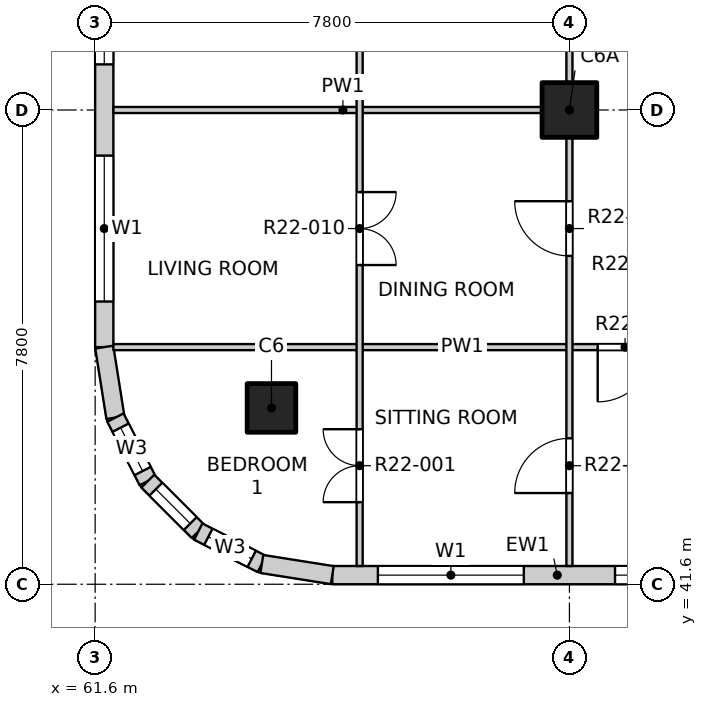
"""IFC4 building model, lengths in metres.
Left out: names, types, materials, properties, quantities, classifications, styles, units other than length and angle.
Written with IfcOpenShell. Run it as: python <this file> out.ifc"""

import sys

from ifc_helpers import new_model, si_unit, direction, frame, frame_2d, origin, origin_2d, place, context, subcontext, project, spatial, rectangle, extrude, element, fill, save


model = new_model("IFC4")
c1 = context("Model", 3, precision=1e-05, world=origin(), true_north=direction((0.0, 1.0)))
c2 = subcontext(c1, "Body", "Model", "MODEL_VIEW")
j1 = project(units=[si_unit("LENGTHUNIT", "METRE"), si_unit("PLANEANGLEUNIT", "RADIAN")], contexts=[c1])
p1 = place(None, origin())
s1 = spatial("IfcSite", under=j1, at=p1, CompositionType="ELEMENT")
p2 = place(p1, origin())
s2 = spatial("IfcBuilding", under=s1, at=p2, CompositionType="ELEMENT")
p3 = place(p2, frame((0.0, 0.0, 224.5)))
s3 = spatial("IfcBuildingStorey", under=s2, at=p3, CompositionType="ELEMENT", Elevation=224.5)
p4 = place(p3, frame((64.5, 44.5, -0.25), z_axis=(0.0, 0.0, 1.0), x_axis=(1.0, 0.0, 0.0)))
e1 = element("IfcColumn", 1, at=p4, inside=s3, PredefinedType="COLUMN", context=c2, shape_type="SweptSolid", body=[
    extrude(rectangle(XDim=0.8, YDim=0.8, at=origin_2d()), origin(), (0.0, 0.0, 1.0), 3.4),
])
p5 = place(p3, frame((69.4, 49.4, -0.25), z_axis=(0.0, 0.0, 1.0), x_axis=(1.0, 0.0, 0.0)))
e2 = element("IfcColumn", 2, at=p5, inside=s3, PredefinedType="COLUMN", context=c2, shape_type="SweptSolid", body=[
    extrude(rectangle(XDim=0.9, YDim=0.9, at=origin_2d()), origin(), (0.0, 0.0, 1.0), 3.4),
])
p6 = place(p3, frame((65.5, 41.75, 0.0), z_axis=(0.0, 0.0, 1.0), x_axis=(1.0, 0.0, 0.0)))
e3 = element("IfcWall", 3, at=p6, inside=s3, PredefinedType="SOLIDWALL", context=c2, shape_type="SweptSolid", body=[
    extrude(rectangle(XDim=7.4, YDim=0.3, at=frame_2d((3.7, 0.0))), origin(), (0.0, 0.0, 1.0), 2.7),
])
p7 = place(p6, frame((0.75, 0.0, 0.9)))
e4 = element("IfcOpeningElement", 4, at=p7, cuts=e3, PredefinedType="OPENING", context=c2, shape_type="SweptSolid", body=[
    extrude(rectangle(XDim=2.4, YDim=1.8, at=frame_2d((1.2, 0.9))), frame((0.0, 0.16, 0.0), z_axis=(0.0, -1.0, 0.0), x_axis=(1.0, 0.0, 0.0)), (0.0, 0.0, 1.0), 0.32),
])
p8 = place(p6, frame((4.65, 0.0, 0.9)))
e5 = element("IfcOpeningElement", 5, at=p8, cuts=e3, PredefinedType="OPENING", context=c2, shape_type="SweptSolid", body=[
    extrude(rectangle(XDim=2.4, YDim=1.8, at=frame_2d((1.2, 0.9))), frame((0.0, 0.16, 0.0), z_axis=(0.0, -1.0, 0.0), x_axis=(1.0, 0.0, 0.0)), (0.0, 0.0, 1.0), 0.32),
])
p9 = place(p3, frame((61.75, 45.5, 0.0), z_axis=(0.0, 0.0, 1.0), x_axis=(0.0, 1.0, 0.0)))
e6 = element("IfcWall", 6, at=p9, inside=s3, PredefinedType="SOLIDWALL", context=c2, shape_type="SweptSolid", body=[
    extrude(rectangle(XDim=7.4, YDim=0.3, at=frame_2d((3.7, 0.0))), origin(), (0.0, 0.0, 1.0), 2.7),
])
p10 = place(p9, frame((0.75, 0.0, 0.9)))
e7 = element("IfcOpeningElement", 7, at=p10, cuts=e6, PredefinedType="OPENING", context=c2, shape_type="SweptSolid", body=[
    extrude(rectangle(XDim=2.4, YDim=1.8, at=frame_2d((1.2, 0.9))), frame((0.0, 0.16, 0.0), z_axis=(0.0, -1.0, 0.0), x_axis=(1.0, 0.0, 0.0)), (0.0, 0.0, 1.0), 0.32),
])
p11 = place(p9, frame((4.65, 0.0, 0.9)))
e8 = element("IfcOpeningElement", 8, at=p11, cuts=e6, PredefinedType="OPENING", context=c2, shape_type="SweptSolid", body=[
    extrude(rectangle(XDim=2.4, YDim=1.8, at=frame_2d((1.2, 0.9))), frame((0.0, 0.16, 0.0), z_axis=(0.0, -1.0, 0.0), x_axis=(1.0, 0.0, 0.0)), (0.0, 0.0, 1.0), 0.32),
])
p12 = place(p3, frame((61.75, 45.5, 0.0), z_axis=(0.0, 0.0, 1.0), x_axis=(0.156496880861, -0.987678452879, 0.0)))
e9 = element("IfcWall", 9, at=p12, inside=s3, PredefinedType="SOLIDWALL", context=c2, shape_type="SweptSolid", body=[
    extrude(rectangle(XDim=1.173, YDim=0.3, at=frame_2d((0.586, 0.0))), origin(), (0.0, 0.0, 1.0), 2.7),
])
p13 = place(p3, frame((61.934, 44.341, 0.0), z_axis=(0.0, 0.0, 1.0), x_axis=(0.454025524128, -0.890988677504, 0.0)))
e10 = element("IfcWall", 10, at=p13, inside=s3, PredefinedType="SOLIDWALL", context=c2, shape_type="SweptSolid", body=[
    extrude(rectangle(XDim=1.173, YDim=0.3, at=frame_2d((0.587, 0.0))), origin(), (0.0, 0.0, 1.0), 2.7),
])
p14 = place(p13, frame((0.187, 0.0, 0.9)))
e11 = element("IfcOpeningElement", 11, at=p14, cuts=e10, PredefinedType="OPENING", context=c2, shape_type="SweptSolid", body=[
    extrude(rectangle(XDim=0.8, YDim=1.2, at=frame_2d((0.4, 0.6))), frame((0.0, 0.16, 0.0), z_axis=(0.0, -1.0, 0.0), x_axis=(1.0, 0.0, 0.0)), (0.0, 0.0, 1.0), 0.32),
])
p15 = place(p3, frame((62.466, 43.296, 0.0), z_axis=(0.0, 0.0, 1.0), x_axis=(0.707106781187, -0.707106781187, 0.0)))
e12 = element("IfcWall", 12, at=p15, inside=s3, PredefinedType="SOLIDWALL", context=c2, shape_type="SweptSolid", body=[
    extrude(rectangle(XDim=1.173, YDim=0.3, at=frame_2d((0.586, 0.0))), origin(), (0.0, 0.0, 1.0), 2.7),
])
p16 = place(p15, frame((0.187, 0.0, 0.9)))
e13 = element("IfcOpeningElement", 13, at=p16, cuts=e12, PredefinedType="OPENING", context=c2, shape_type="SweptSolid", body=[
    extrude(rectangle(XDim=0.8, YDim=1.2, at=frame_2d((0.4, 0.6))), frame((0.0, 0.16, 0.0), z_axis=(0.0, -1.0, 0.0), x_axis=(1.0, 0.0, 0.0)), (0.0, 0.0, 1.0), 0.32),
])
p17 = place(p3, frame((63.296, 42.466, 0.0), z_axis=(0.0, 0.0, 1.0), x_axis=(0.890988677504, -0.454025524128, 0.0)))
e14 = element("IfcWall", 14, at=p17, inside=s3, PredefinedType="SOLIDWALL", context=c2, shape_type="SweptSolid", body=[
    extrude(rectangle(XDim=1.173, YDim=0.3, at=frame_2d((0.587, 0.0))), origin(), (0.0, 0.0, 1.0), 2.7),
])
p18 = place(p17, frame((0.187, 0.0, 0.9)))
e15 = element("IfcOpeningElement", 15, at=p18, cuts=e14, PredefinedType="OPENING", context=c2, shape_type="SweptSolid", body=[
    extrude(rectangle(XDim=0.8, YDim=1.2, at=frame_2d((0.4, 0.6))), frame((0.0, 0.16, 0.0), z_axis=(0.0, -1.0, 0.0), x_axis=(1.0, 0.0, 0.0)), (0.0, 0.0, 1.0), 0.32),
])
p19 = place(p3, frame((64.341, 41.934, 0.0), z_axis=(0.0, 0.0, 1.0), x_axis=(0.987678452879, -0.156496880861, 0.0)))
e16 = element("IfcWall", 16, at=p19, inside=s3, PredefinedType="SOLIDWALL", context=c2, shape_type="SweptSolid", body=[
    extrude(rectangle(XDim=1.173, YDim=0.3, at=frame_2d((0.586, 0.0))), origin(), (0.0, 0.0, 1.0), 2.7),
])
p20 = place(p3, frame((61.9, 45.5, 0.0), z_axis=(0.0, 0.0, 1.0), x_axis=(1.0, 0.0, 0.0)))
e17 = element("IfcWall", 17, at=p20, inside=s3, PredefinedType="PARTITIONING", context=c2, shape_type="SweptSolid", body=[
    extrude(rectangle(XDim=11.475, YDim=0.1, at=frame_2d((5.737, 0.0))), origin(), (0.0, 0.0, 1.0), 3.15),
])
p21 = place(p20, frame((7.965, 0.0, 0.0)))
e18 = element("IfcOpeningElement", 18, at=p21, cuts=e17, PredefinedType="OPENING", context=c2, shape_type="SweptSolid", body=[
    extrude(rectangle(XDim=0.9, YDim=2.1, at=frame_2d((0.45, 1.05))), frame((0.0, 0.06, 0.0), z_axis=(0.0, -1.0, 0.0), x_axis=(1.0, 0.0, 0.0)), (0.0, 0.0, 1.0), 0.12),
])
p22 = place(p3, frame((61.9, 49.4, 0.0), z_axis=(0.0, 0.0, 1.0), x_axis=(1.0, 0.0, 0.0)))
e19 = element("IfcWall", 19, at=p22, inside=s3, PredefinedType="PARTITIONING", context=c2, shape_type="SweptSolid", body=[
    extrude(rectangle(XDim=7.55, YDim=0.1, at=frame_2d((3.775, 0.0))), origin(), (0.0, 0.0, 1.0), 3.15),
])
p23 = place(p3, frame((65.95, 41.9, 0.0), z_axis=(0.0, 0.0, 1.0), x_axis=(0.0, 1.0, 0.0)))
e20 = element("IfcWall", 20, at=p23, inside=s3, PredefinedType="PARTITIONING", context=c2, shape_type="SweptSolid", body=[
    extrude(rectangle(XDim=19.1, YDim=0.1, at=frame_2d((9.55, 0.0))), origin(), (0.0, 0.0, 1.0), 3.15),
])
p24 = place(p23, frame((1.05, 0.0, 0.0)))
e21 = element("IfcOpeningElement", 21, at=p24, cuts=e20, PredefinedType="OPENING", context=c2, shape_type="SweptSolid", body=[
    extrude(rectangle(XDim=1.2, YDim=2.1, at=frame_2d((0.6, 1.05))), frame((0.0, 0.06, 0.0), z_axis=(0.0, -1.0, 0.0), x_axis=(1.0, 0.0, 0.0)), (0.0, 0.0, 1.0), 0.12),
])
p25 = place(p23, frame((4.95, 0.0, 0.0)))
e22 = element("IfcOpeningElement", 22, at=p25, cuts=e20, PredefinedType="OPENING", context=c2, shape_type="SweptSolid", body=[
    extrude(rectangle(XDim=1.2, YDim=2.1, at=frame_2d((0.6, 1.05))), frame((0.0, 0.06, 0.0), z_axis=(0.0, -1.0, 0.0), x_axis=(1.0, 0.0, 0.0)), (0.0, 0.0, 1.0), 0.12),
])
p26 = place(p23, frame((8.85, 0.0, 0.0)))
e23 = element("IfcOpeningElement", 23, at=p26, cuts=e20, PredefinedType="OPENING", context=c2, shape_type="SweptSolid", body=[
    extrude(rectangle(XDim=1.2, YDim=2.1, at=frame_2d((0.6, 1.05))), frame((0.0, 0.06, 0.0), z_axis=(0.0, -1.0, 0.0), x_axis=(1.0, 0.0, 0.0)), (0.0, 0.0, 1.0), 0.12),
])
p27 = place(p23, frame((11.925, 0.0, 0.0)))
e24 = element("IfcOpeningElement", 24, at=p27, cuts=e20, PredefinedType="OPENING", context=c2, shape_type="SweptSolid", body=[
    extrude(rectangle(XDim=0.9, YDim=2.1, at=frame_2d((0.45, 1.05))), frame((0.0, 0.06, 0.0), z_axis=(0.0, -1.0, 0.0), x_axis=(1.0, 0.0, 0.0)), (0.0, 0.0, 1.0), 0.12),
])
p28 = place(p23, frame((13.875, 0.0, 0.0)))
e25 = element("IfcOpeningElement", 25, at=p28, cuts=e20, PredefinedType="OPENING", context=c2, shape_type="SweptSolid", body=[
    extrude(rectangle(XDim=0.9, YDim=2.1, at=frame_2d((0.45, 1.05))), frame((0.0, 0.06, 0.0), z_axis=(0.0, -1.0, 0.0), x_axis=(1.0, 0.0, 0.0)), (0.0, 0.0, 1.0), 0.12),
])
p29 = place(p23, frame((15.825, 0.0, 0.0)))
e26 = element("IfcOpeningElement", 26, at=p29, cuts=e20, PredefinedType="OPENING", context=c2, shape_type="SweptSolid", body=[
    extrude(rectangle(XDim=0.9, YDim=2.1, at=frame_2d((0.45, 1.05))), frame((0.0, 0.06, 0.0), z_axis=(0.0, -1.0, 0.0), x_axis=(1.0, 0.0, 0.0)), (0.0, 0.0, 1.0), 0.12),
])
p30 = place(p23, frame((17.775, 0.0, 0.0)))
e27 = element("IfcOpeningElement", 27, at=p30, cuts=e20, PredefinedType="OPENING", context=c2, shape_type="SweptSolid", body=[
    extrude(rectangle(XDim=0.9, YDim=2.1, at=frame_2d((0.45, 1.05))), frame((0.0, 0.06, 0.0), z_axis=(0.0, -1.0, 0.0), x_axis=(1.0, 0.0, 0.0)), (0.0, 0.0, 1.0), 0.12),
])
p31 = place(p3, frame((69.4, 41.9, 0.0), z_axis=(0.0, 0.0, 1.0), x_axis=(0.0, 1.0, 0.0)))
e28 = element("IfcWall", 28, at=p31, inside=s3, PredefinedType="PARTITIONING", context=c2, shape_type="SweptSolid", body=[
    extrude(rectangle(XDim=46.2, YDim=0.1, at=frame_2d((23.1, 0.0))), origin(), (0.0, 0.0, 1.0), 3.15),
])
p32 = place(p31, frame((1.2, 0.0, 0.0)))
e29 = element("IfcOpeningElement", 29, at=p32, cuts=e28, PredefinedType="OPENING", context=c2, shape_type="SweptSolid", body=[
    extrude(rectangle(XDim=0.9, YDim=2.1, at=frame_2d((0.45, 1.05))), frame((0.0, 0.06, 0.0), z_axis=(0.0, -1.0, 0.0), x_axis=(1.0, 0.0, 0.0)), (0.0, 0.0, 1.0), 0.12),
])
p33 = place(p31, frame((5.1, 0.0, 0.0)))
e30 = element("IfcOpeningElement", 30, at=p33, cuts=e28, PredefinedType="OPENING", context=c2, shape_type="SweptSolid", body=[
    extrude(rectangle(XDim=0.9, YDim=2.1, at=frame_2d((0.45, 1.05))), frame((0.0, 0.06, 0.0), z_axis=(0.0, -1.0, 0.0), x_axis=(1.0, 0.0, 0.0)), (0.0, 0.0, 1.0), 0.12),
])
p34 = place(p31, frame((9.0, 0.0, 0.0)))
e31 = element("IfcOpeningElement", 31, at=p34, cuts=e28, PredefinedType="OPENING", context=c2, shape_type="SweptSolid", body=[
    extrude(rectangle(XDim=0.9, YDim=2.1, at=frame_2d((0.45, 1.05))), frame((0.0, 0.06, 0.0), z_axis=(0.0, -1.0, 0.0), x_axis=(1.0, 0.0, 0.0)), (0.0, 0.0, 1.0), 0.12),
])
p35 = place(p31, frame((13.85, 0.0, 0.0)))
e32 = element("IfcOpeningElement", 32, at=p35, cuts=e28, PredefinedType="OPENING", context=c2, shape_type="SweptSolid", body=[
    extrude(rectangle(XDim=0.9, YDim=2.1, at=frame_2d((0.45, 1.05))), frame((0.0, 0.06, 0.0), z_axis=(0.0, -1.0, 0.0), x_axis=(1.0, 0.0, 0.0)), (0.0, 0.0, 1.0), 0.12),
])
p36 = place(p31, frame((17.775, 0.0, 0.0)))
e33 = element("IfcOpeningElement", 33, at=p36, cuts=e28, PredefinedType="OPENING", context=c2, shape_type="SweptSolid", body=[
    extrude(rectangle(XDim=0.9, YDim=2.1, at=frame_2d((0.45, 1.05))), frame((0.0, 0.06, 0.0), z_axis=(0.0, -1.0, 0.0), x_axis=(1.0, 0.0, 0.0)), (0.0, 0.0, 1.0), 0.12),
])
p37 = place(p31, frame((21.625, 0.0, 0.0)))
e34 = element("IfcOpeningElement", 34, at=p37, cuts=e28, PredefinedType="OPENING", context=c2, shape_type="SweptSolid", body=[
    extrude(rectangle(XDim=0.9, YDim=2.1, at=frame_2d((0.45, 1.05))), frame((0.0, 0.06, 0.0), z_axis=(0.0, -1.0, 0.0), x_axis=(1.0, 0.0, 0.0)), (0.0, 0.0, 1.0), 0.12),
])
p38 = place(p31, frame((24.6, 0.0, 0.0)))
e35 = element("IfcOpeningElement", 35, at=p38, cuts=e28, PredefinedType="OPENING", context=c2, shape_type="SweptSolid", body=[
    extrude(rectangle(XDim=0.9, YDim=2.1, at=frame_2d((0.45, 1.05))), frame((0.0, 0.06, 0.0), z_axis=(0.0, -1.0, 0.0), x_axis=(1.0, 0.0, 0.0)), (0.0, 0.0, 1.0), 0.12),
])
p39 = place(p31, frame((29.425, 0.0, 0.0)))
e36 = element("IfcOpeningElement", 36, at=p39, cuts=e28, PredefinedType="OPENING", context=c2, shape_type="SweptSolid", body=[
    extrude(rectangle(XDim=0.9, YDim=2.1, at=frame_2d((0.45, 1.05))), frame((0.0, 0.06, 0.0), z_axis=(0.0, -1.0, 0.0), x_axis=(1.0, 0.0, 0.0)), (0.0, 0.0, 1.0), 0.12),
])
p40 = place(p31, frame((33.375, 0.0, 0.0)))
e37 = element("IfcOpeningElement", 37, at=p40, cuts=e28, PredefinedType="OPENING", context=c2, shape_type="SweptSolid", body=[
    extrude(rectangle(XDim=0.9, YDim=2.1, at=frame_2d((0.45, 1.05))), frame((0.0, 0.06, 0.0), z_axis=(0.0, -1.0, 0.0), x_axis=(1.0, 0.0, 0.0)), (0.0, 0.0, 1.0), 0.12),
])
p41 = place(p31, frame((36.3, 0.0, 0.0)))
e38 = element("IfcOpeningElement", 38, at=p41, cuts=e28, PredefinedType="OPENING", context=c2, shape_type="SweptSolid", body=[
    extrude(rectangle(XDim=0.9, YDim=2.1, at=frame_2d((0.45, 1.05))), frame((0.0, 0.06, 0.0), z_axis=(0.0, -1.0, 0.0), x_axis=(1.0, 0.0, 0.0)), (0.0, 0.0, 1.0), 0.12),
])
p42 = place(p31, frame((41.175, 0.0, 0.0)))
e39 = element("IfcOpeningElement", 39, at=p42, cuts=e28, PredefinedType="OPENING", context=c2, shape_type="SweptSolid", body=[
    extrude(rectangle(XDim=0.9, YDim=2.1, at=frame_2d((0.45, 1.05))), frame((0.0, 0.06, 0.0), z_axis=(0.0, -1.0, 0.0), x_axis=(1.0, 0.0, 0.0)), (0.0, 0.0, 1.0), 0.12),
])
p43 = place(p31, frame((44.1, 0.0, 0.0)))
e40 = element("IfcOpeningElement", 40, at=p43, cuts=e28, PredefinedType="OPENING", context=c2, shape_type="SweptSolid", body=[
    extrude(rectangle(XDim=0.9, YDim=2.1, at=frame_2d((0.45, 1.05))), frame((0.0, 0.06, 0.0), z_axis=(0.0, -1.0, 0.0), x_axis=(1.0, 0.0, 0.0)), (0.0, 0.0, 1.0), 0.12),
])
p44 = place(p7, origin())
e41 = element("IfcWindow", 41, at=p44, inside=s3, PartitioningType="DOUBLE_PANEL_VERTICAL", PredefinedType="WINDOW", context=c2, shape_type="SweptSolid", body=[
    extrude(rectangle(XDim=2.4, YDim=1.8, at=frame_2d((1.2, 0.9))), frame((0.0, 0.03, 0.0), z_axis=(0.0, -1.0, 0.0), x_axis=(1.0, 0.0, 0.0)), (0.0, 0.0, 1.0), 0.06),
])
fill(e4, e41)
p45 = place(p8, origin())
e42 = element("IfcWindow", 42, at=p45, inside=s3, PartitioningType="DOUBLE_PANEL_VERTICAL", PredefinedType="WINDOW", context=c2, shape_type="SweptSolid", body=[
    extrude(rectangle(XDim=2.4, YDim=1.8, at=frame_2d((1.2, 0.9))), frame((0.0, 0.03, 0.0), z_axis=(0.0, -1.0, 0.0), x_axis=(1.0, 0.0, 0.0)), (0.0, 0.0, 1.0), 0.06),
])
fill(e5, e42)
p46 = place(p10, origin())
e43 = element("IfcWindow", 43, at=p46, inside=s3, PartitioningType="DOUBLE_PANEL_VERTICAL", PredefinedType="WINDOW", context=c2, shape_type="SweptSolid", body=[
    extrude(rectangle(XDim=2.4, YDim=1.8, at=frame_2d((1.2, 0.9))), frame((0.0, 0.03, 0.0), z_axis=(0.0, -1.0, 0.0), x_axis=(1.0, 0.0, 0.0)), (0.0, 0.0, 1.0), 0.06),
])
fill(e7, e43)
p47 = place(p11, origin())
e44 = element("IfcWindow", 44, at=p47, inside=s3, PartitioningType="DOUBLE_PANEL_VERTICAL", PredefinedType="WINDOW", context=c2, shape_type="SweptSolid", body=[
    extrude(rectangle(XDim=2.4, YDim=1.8, at=frame_2d((1.2, 0.9))), frame((0.0, 0.03, 0.0), z_axis=(0.0, -1.0, 0.0), x_axis=(1.0, 0.0, 0.0)), (0.0, 0.0, 1.0), 0.06),
])
fill(e8, e44)
p48 = place(p14, origin())
e45 = element("IfcWindow", 45, at=p48, inside=s3, PartitioningType="SINGLE_PANEL", PredefinedType="WINDOW", context=c2, shape_type="SweptSolid", body=[
    extrude(rectangle(XDim=0.8, YDim=1.2, at=frame_2d((0.4, 0.6))), frame((0.0, 0.03, 0.0), z_axis=(0.0, -1.0, 0.0), x_axis=(1.0, 0.0, 0.0)), (0.0, 0.0, 1.0), 0.06),
])
fill(e11, e45)
p49 = place(p16, origin())
e46 = element("IfcWindow", 46, at=p49, inside=s3, PartitioningType="SINGLE_PANEL", PredefinedType="WINDOW", context=c2, shape_type="SweptSolid", body=[
    extrude(rectangle(XDim=0.8, YDim=1.2, at=frame_2d((0.4, 0.6))), frame((0.0, 0.03, 0.0), z_axis=(0.0, -1.0, 0.0), x_axis=(1.0, 0.0, 0.0)), (0.0, 0.0, 1.0), 0.06),
])
fill(e13, e46)
p50 = place(p18, origin())
e47 = element("IfcWindow", 47, at=p50, inside=s3, PartitioningType="SINGLE_PANEL", PredefinedType="WINDOW", context=c2, shape_type="SweptSolid", body=[
    extrude(rectangle(XDim=0.8, YDim=1.2, at=frame_2d((0.4, 0.6))), frame((0.0, 0.03, 0.0), z_axis=(0.0, -1.0, 0.0), x_axis=(1.0, 0.0, 0.0)), (0.0, 0.0, 1.0), 0.06),
])
fill(e15, e47)
p51 = place(p24, origin())
e48 = element("IfcDoor", 48, at=p51, inside=s3, OperationType="DOUBLE_DOOR_SINGLE_SWING", PredefinedType="DOOR", context=c2, shape_type="SweptSolid", body=[
    extrude(rectangle(XDim=1.2, YDim=2.1, at=frame_2d((0.6, 1.05))), frame((0.0, 0.025, 0.0), z_axis=(0.0, -1.0, 0.0), x_axis=(1.0, 0.0, 0.0)), (0.0, 0.0, 1.0), 0.05),
])
fill(e21, e48)
p52 = place(p32, origin())
e49 = element("IfcDoor", 49, at=p52, inside=s3, OperationType="SINGLE_SWING_LEFT", PredefinedType="DOOR", context=c2, shape_type="SweptSolid", body=[
    extrude(rectangle(XDim=0.9, YDim=2.1, at=frame_2d((0.45, 1.05))), frame((0.0, 0.025, 0.0), z_axis=(0.0, -1.0, 0.0), x_axis=(1.0, 0.0, 0.0)), (0.0, 0.0, 1.0), 0.05),
])
fill(e29, e49)
p53 = place(p21, origin())
e50 = element("IfcDoor", 50, at=p53, inside=s3, OperationType="SINGLE_SWING_RIGHT", PredefinedType="DOOR", context=c2, shape_type="SweptSolid", body=[
    extrude(rectangle(XDim=0.9, YDim=2.1, at=frame_2d((0.45, 1.05))), frame((0.0, 0.025, 0.0), z_axis=(0.0, -1.0, 0.0), x_axis=(1.0, 0.0, 0.0)), (0.0, 0.0, 1.0), 0.05),
])
fill(e18, e50)
p54 = place(p25, origin())
e51 = element("IfcDoor", 51, at=p54, inside=s3, OperationType="DOUBLE_DOOR_SINGLE_SWING", PredefinedType="DOOR", context=c2, shape_type="SweptSolid", body=[
    extrude(rectangle(XDim=1.2, YDim=2.1, at=frame_2d((0.6, 1.05))), frame((0.0, 0.025, 0.0), z_axis=(0.0, -1.0, 0.0), x_axis=(1.0, 0.0, 0.0)), (0.0, 0.0, 1.0), 0.05),
])
fill(e22, e51)
p55 = place(p33, origin())
e52 = element("IfcDoor", 52, at=p55, inside=s3, OperationType="SINGLE_SWING_RIGHT", PredefinedType="DOOR", context=c2, shape_type="SweptSolid", body=[
    extrude(rectangle(XDim=0.9, YDim=2.1, at=frame_2d((0.45, 1.05))), frame((0.0, 0.025, 0.0), z_axis=(0.0, -1.0, 0.0), x_axis=(1.0, 0.0, 0.0)), (0.0, 0.0, 1.0), 0.05),
])
fill(e30, e52)
save(model, sys.argv[1])
